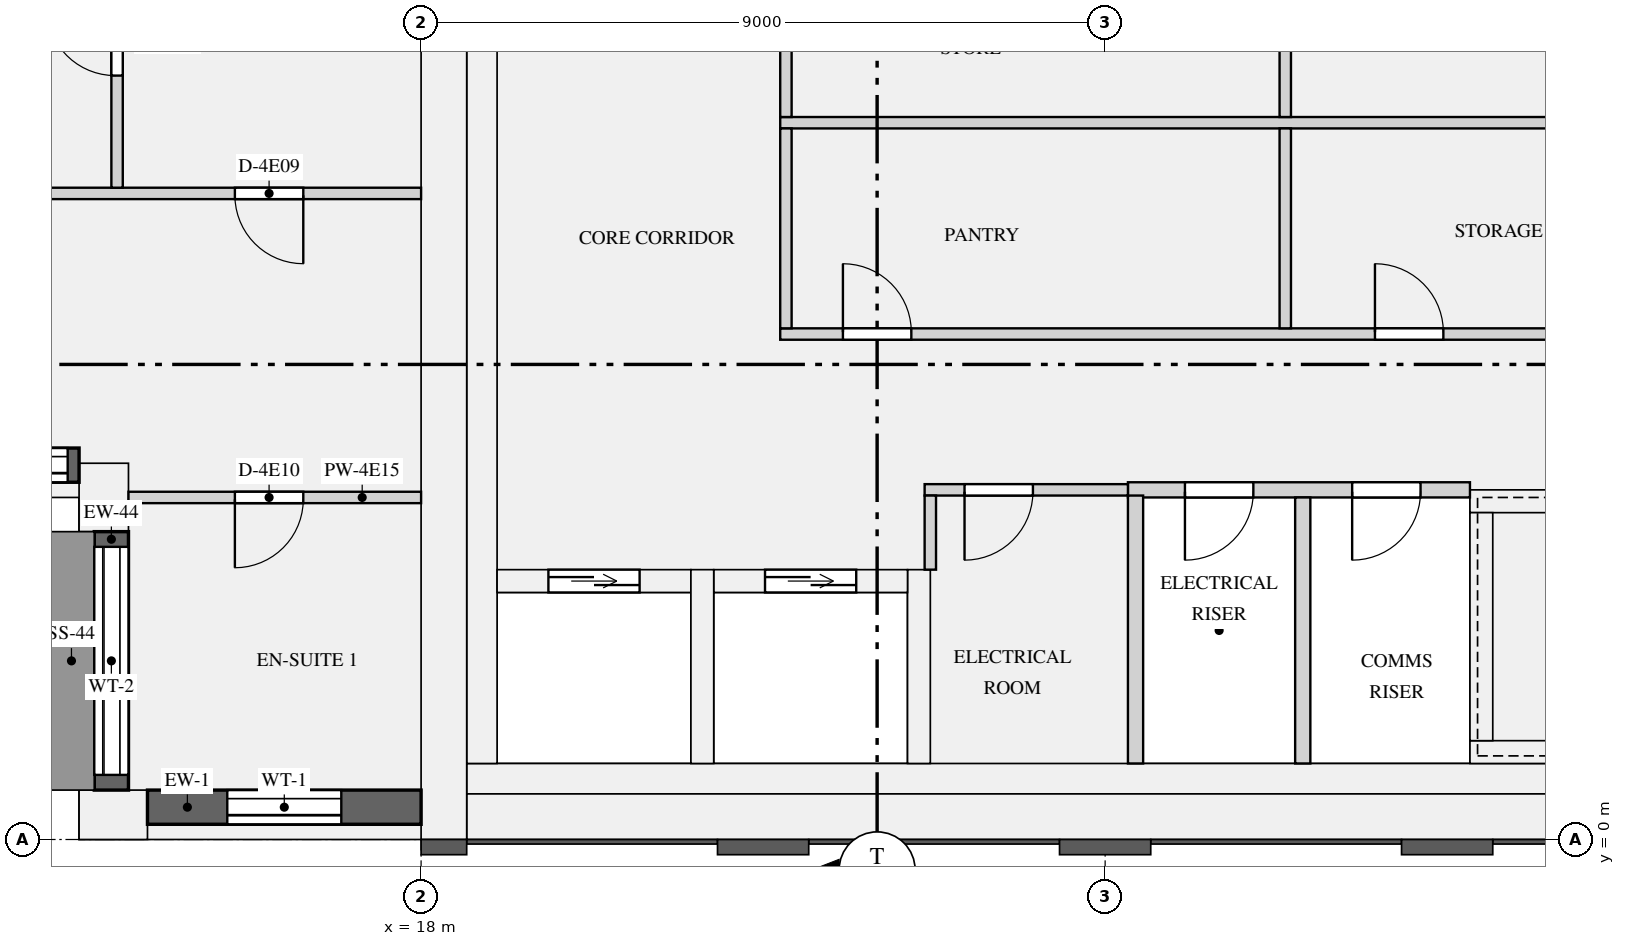
"""IFC4 building model, lengths in metres.
Left out: names, types, materials, properties, quantities, classifications, styles, units other than length and angle.
Written with IfcOpenShell. Run it as: python <this file> out.ifc"""

import sys

from ifc_helpers import new_model, si_unit, direction, frame, frame_2d, origin, origin_2d, place, context, subcontext, project, spatial, rectangle, extrude, element, fill, save


model = new_model("IFC4")
c1 = context("Model", 3, precision=1e-05, world=origin(), true_north=direction((0.0, 1.0)))
c2 = subcontext(c1, "Body", "Model", "MODEL_VIEW")
j1 = project(units=[si_unit("LENGTHUNIT", "METRE"), si_unit("PLANEANGLEUNIT", "RADIAN")], contexts=[c1])
p1 = place(None, origin())
s1 = spatial("IfcSite", under=j1, at=p1, CompositionType="ELEMENT")
p2 = place(p1, origin())
s2 = spatial("IfcBuilding", under=s1, at=p2, CompositionType="ELEMENT")
p3 = place(p2, frame((0.0, 0.0, 232.65)))
s3 = spatial("IfcBuildingStorey", under=s2, at=p3, CompositionType="ELEMENT", Elevation=232.65)
for number, where, z_axis, x_axis in (
    (1, (13.95, 0.325, 0.0), (0.0, 0.0, 1.0), (1.0, 0.0, 0.0)),
    (2, (13.825, 4.5, 0.0), (0.0, 0.0, 1.0), (0.0, -1.0, 0.0)),
):
    element("IfcColumn", number, at=place(p3, frame(where, z_axis=z_axis, x_axis=x_axis)), inside=s3, PredefinedType="USERDEFINED", context=c2, shape_type="SweptSolid", body=[
        extrude(rectangle(XDim=0.9, YDim=0.65, at=origin_2d()), origin(), (0.0, 0.0, 1.0), 3.15),
    ])
p4 = place(p3, frame((18.3, 0.0, 0.0), z_axis=(0.0, 0.0, 1.0), x_axis=(0.0, 1.0, 0.0)))
e3 = element("IfcWall", 3, at=p4, inside=s3, PredefinedType="SHEAR", context=c2, shape_type="SweptSolid", body=[
    extrude(rectangle(XDim=12.5, YDim=0.6, at=frame_2d((6.25, 0.0))), origin(), (0.0, 0.0, 1.0), 3.15),
])
p5 = place(p3, frame((18.6, 0.3, 0.0), z_axis=(0.0, 0.0, 1.0), x_axis=(1.0, 0.0, 0.0)))
e4 = element("IfcWall", 4, at=p5, inside=s3, PredefinedType="SHEAR", context=c2, shape_type="SweptSolid", body=[
    extrude(rectangle(XDim=34.8, YDim=0.6, at=frame_2d((17.4, 0.0))), origin(), (0.0, 0.0, 1.0), 3.15),
])
p6 = place(p3, frame((18.8, 1.0, 0.0), z_axis=(0.0, 0.0, 1.0), x_axis=(0.0, 1.0, 0.0)))
e5 = element("IfcWall", 5, at=p6, inside=s3, PredefinedType="SHEAR", context=c2, shape_type="SweptSolid", body=[
    extrude(rectangle(XDim=10.9, YDim=0.4, at=frame_2d((5.45, 0.0))), origin(), (0.0, 0.0, 1.0), 3.15),
])
p7 = place(p3, frame((18.6, 0.8, 0.0), z_axis=(0.0, 0.0, 1.0), x_axis=(1.0, 0.0, 0.0)))
e6 = element("IfcWall", 6, at=p7, inside=s3, PredefinedType="SHEAR", context=c2, shape_type="SweptSolid", body=[
    extrude(rectangle(XDim=34.8, YDim=0.4, at=frame_2d((17.4, 0.0))), origin(), (0.0, 0.0, 1.0), 3.15),
])
p8 = place(p3, frame((19.0, 3.4, 0.0), z_axis=(0.0, 0.0, 1.0), x_axis=(1.0, 0.0, 0.0)))
e7 = element("IfcWall", 7, at=p8, inside=s3, PredefinedType="SHEAR", context=c2, shape_type="SweptSolid", body=[
    extrude(rectangle(XDim=2.55, YDim=0.3, at=frame_2d((1.275, 0.0))), origin(), (0.0, 0.0, 1.0), 3.15),
])
p9 = place(p8, frame((0.675, 0.0, 0.0)))
e8 = element("IfcOpeningElement", 8, at=p9, cuts=e7, PredefinedType="OPENING", context=c2, shape_type="SweptSolid", body=[
    extrude(rectangle(XDim=1.2, YDim=2.1, at=frame_2d((0.6, 1.05))), frame((0.0, 0.16, 0.0), z_axis=(0.0, -1.0, 0.0), x_axis=(1.0, 0.0, 0.0)), (0.0, 0.0, 1.0), 0.32),
])
p10 = place(p3, frame((21.85, 3.4, 0.0), z_axis=(0.0, 0.0, 1.0), x_axis=(1.0, 0.0, 0.0)))
e9 = element("IfcWall", 9, at=p10, inside=s3, PredefinedType="SHEAR", context=c2, shape_type="SweptSolid", body=[
    extrude(rectangle(XDim=2.55, YDim=0.3, at=frame_2d((1.275, 0.0))), origin(), (0.0, 0.0, 1.0), 3.15),
])
p11 = place(p10, frame((0.675, 0.0, 0.0)))
e10 = element("IfcOpeningElement", 10, at=p11, cuts=e9, PredefinedType="OPENING", context=c2, shape_type="SweptSolid", body=[
    extrude(rectangle(XDim=1.2, YDim=2.1, at=frame_2d((0.6, 1.05))), frame((0.0, 0.16, 0.0), z_axis=(0.0, -1.0, 0.0), x_axis=(1.0, 0.0, 0.0)), (0.0, 0.0, 1.0), 0.32),
])
for number, where, z_axis, x_axis in (
    (11, (21.7, 1.0, 0.0), (0.0, 0.0, 1.0), (0.0, 1.0, 0.0)),
    (12, (24.55, 1.0, 0.0), (0.0, 0.0, 1.0), (0.0, 1.0, 0.0)),
):
    element("IfcWall", number, at=place(p3, frame(where, z_axis=z_axis, x_axis=x_axis)), inside=s3, PredefinedType="SHEAR", context=c2, shape_type="SweptSolid", body=[
        extrude(rectangle(XDim=2.55, YDim=0.3, at=frame_2d((1.275, 0.0))), origin(), (0.0, 0.0, 1.0), 3.15),
    ])
p12 = place(p3, frame((31.8, 1.15, 0.0), z_axis=(0.0, 0.0, 1.0), x_axis=(1.0, 0.0, 0.0)))
e13 = element("IfcWall", 13, at=p12, inside=s3, PredefinedType="SHEAR", context=c2, shape_type="SweptSolid", body=[
    extrude(rectangle(XDim=8.4, YDim=0.3, at=frame_2d((4.2, 0.0))), origin(), (0.0, 0.0, 1.0), 3.15),
])
p13 = place(p3, frame((31.8, 4.45, 0.0), z_axis=(0.0, 0.0, 1.0), x_axis=(1.0, 0.0, 0.0)))
e14 = element("IfcWall", 14, at=p13, inside=s3, PredefinedType="SHEAR", context=c2, shape_type="SweptSolid", body=[
    extrude(rectangle(XDim=8.4, YDim=0.3, at=frame_2d((4.2, 0.0))), origin(), (0.0, 0.0, 1.0), 3.15),
])
p14 = place(p13, frame((6.8, 0.0, 0.0)))
e15 = element("IfcOpeningElement", 15, at=p14, cuts=e14, PredefinedType="OPENING", context=c2, shape_type="SweptSolid", body=[
    extrude(rectangle(XDim=1.1, YDim=2.1, at=frame_2d((0.55, 1.05))), frame((0.0, 0.16, 0.0), z_axis=(0.0, -1.0, 0.0), x_axis=(1.0, 0.0, 0.0)), (0.0, 0.0, 1.0), 0.32),
])
p15 = place(p3, frame((31.95, 1.3, 0.0), z_axis=(0.0, 0.0, 1.0), x_axis=(0.0, 1.0, 0.0)))
e16 = element("IfcWall", 16, at=p15, inside=s3, PredefinedType="SHEAR", context=c2, shape_type="SweptSolid", body=[
    extrude(rectangle(XDim=3.0, YDim=0.3, at=frame_2d((1.5, 0.0))), origin(), (0.0, 0.0, 1.0), 3.15),
])
p16 = place(p3, frame((14.4, 0.425, 0.9), z_axis=(0.0, 0.0, 1.0), x_axis=(1.0, 0.0, 0.0)))
e17 = element("IfcWall", 17, at=p16, inside=s3, PredefinedType="SOLIDWALL", context=c2, shape_type="SweptSolid", body=[
    extrude(rectangle(XDim=3.6, YDim=0.45, at=frame_2d((1.8, 0.0))), origin(), (0.0, 0.0, 1.0), 1.9),
])
p17 = place(p16, frame((1.05, 0.0, 0.15)))
e18 = element("IfcOpeningElement", 18, at=p17, cuts=e17, PredefinedType="OPENING", context=c2, shape_type="SweptSolid", body=[
    extrude(rectangle(XDim=1.5, YDim=1.5, at=frame_2d((0.75, 0.75))), frame((0.0, 0.235, 0.0), z_axis=(0.0, -1.0, 0.0), x_axis=(1.0, 0.0, 0.0)), (0.0, 0.0, 1.0), 0.47),
])
p18 = place(p3, frame((9.9, 4.925, 0.9), z_axis=(0.0, 0.0, 1.0), x_axis=(1.0, 0.0, 0.0)))
e19 = element("IfcWall", 19, at=p18, inside=s3, PredefinedType="SOLIDWALL", context=c2, shape_type="SweptSolid", body=[
    extrude(rectangle(XDim=3.6, YDim=0.45, at=frame_2d((1.8, 0.0))), origin(), (0.0, 0.0, 1.0), 1.9),
])
p19 = place(p18, frame((0.15, 0.0, 0.15)))
e20 = element("IfcOpeningElement", 20, at=p19, cuts=e19, PredefinedType="OPENING", context=c2, shape_type="SweptSolid", body=[
    extrude(rectangle(XDim=3.3, YDim=1.5, at=frame_2d((1.65, 0.75))), frame((0.0, 0.235, 0.0), z_axis=(0.0, -1.0, 0.0), x_axis=(1.0, 0.0, 0.0)), (0.0, 0.0, 1.0), 0.47),
])
p20 = place(p3, frame((13.925, 4.05, 0.9), z_axis=(0.0, 0.0, 1.0), x_axis=(0.0, -1.0, 0.0)))
e21 = element("IfcWall", 21, at=p20, inside=s3, PredefinedType="SOLIDWALL", context=c2, shape_type="SweptSolid", body=[
    extrude(rectangle(XDim=3.4, YDim=0.45, at=frame_2d((1.7, 0.0))), origin(), (0.0, 0.0, 1.0), 1.9),
])
p21 = place(p20, frame((0.2, 0.0, 0.15)))
e22 = element("IfcOpeningElement", 22, at=p21, cuts=e21, PredefinedType="OPENING", context=c2, shape_type="SweptSolid", body=[
    extrude(rectangle(XDim=3.0, YDim=1.5, at=frame_2d((1.5, 0.75))), frame((0.0, 0.235, 0.0), z_axis=(0.0, -1.0, 0.0), x_axis=(1.0, 0.0, 0.0)), (0.0, 0.0, 1.0), 0.47),
])
p22 = place(p3, frame((27.3, 4.6, 0.0), z_axis=(0.0, 0.0, 1.0), x_axis=(1.0, 0.0, 0.0)))
e23 = element("IfcWall", 23, at=p22, inside=s3, PredefinedType="PARTITIONING", context=c2, shape_type="SweptSolid", body=[
    extrude(rectangle(XDim=4.5, YDim=0.2, at=frame_2d((2.25, 0.0))), origin(), (0.0, 0.0, 1.0), 2.8),
])
p23 = place(p22, frame((0.75, 0.0, 0.0)))
e24 = element("IfcOpeningElement", 24, at=p23, cuts=e23, PredefinedType="OPENING", context=c2, shape_type="SweptSolid", body=[
    extrude(rectangle(XDim=0.9, YDim=2.1, at=frame_2d((0.45, 1.05))), frame((0.0, 0.11, 0.0), z_axis=(0.0, -1.0, 0.0), x_axis=(1.0, 0.0, 0.0)), (0.0, 0.0, 1.0), 0.22),
])
p24 = place(p22, frame((2.95, 0.0, 0.0)))
e25 = element("IfcOpeningElement", 25, at=p24, cuts=e23, PredefinedType="OPENING", context=c2, shape_type="SweptSolid", body=[
    extrude(rectangle(XDim=0.9, YDim=2.1, at=frame_2d((0.45, 1.05))), frame((0.0, 0.11, 0.0), z_axis=(0.0, -1.0, 0.0), x_axis=(1.0, 0.0, 0.0)), (0.0, 0.0, 1.0), 0.22),
])
p25 = place(p3, frame((24.625, 4.6, 0.0), z_axis=(0.0, 0.0, 1.0), x_axis=(1.0, 0.0, 0.0)))
e26 = element("IfcWall", 26, at=p25, inside=s3, PredefinedType="PARTITIONING", context=c2, shape_type="SweptSolid", body=[
    extrude(rectangle(XDim=2.675, YDim=0.15, at=frame_2d((1.337, 0.0))), origin(), (0.0, 0.0, 1.0), 2.8),
])
p26 = place(p25, frame((0.525, 0.0, 0.0)))
e27 = element("IfcOpeningElement", 27, at=p26, cuts=e26, PredefinedType="OPENING", context=c2, shape_type="SweptSolid", body=[
    extrude(rectangle(XDim=0.9, YDim=2.1, at=frame_2d((0.45, 1.05))), frame((0.0, 0.085, 0.0), z_axis=(0.0, -1.0, 0.0), x_axis=(1.0, 0.0, 0.0)), (0.0, 0.0, 1.0), 0.17),
])
p27 = place(p3, frame((22.725, 6.65, 0.0), z_axis=(0.0, 0.0, 1.0), x_axis=(1.0, 0.0, 0.0)))
e28 = element("IfcWall", 28, at=p27, inside=s3, PredefinedType="PARTITIONING", context=c2, shape_type="SweptSolid", body=[
    extrude(rectangle(XDim=19.8, YDim=0.15, at=frame_2d((9.9, 0.0))), origin(), (0.0, 0.0, 1.0), 2.8),
])
p28 = place(p27, frame((0.825, 0.0, 0.0)))
e29 = element("IfcOpeningElement", 29, at=p28, cuts=e28, PredefinedType="OPENING", context=c2, shape_type="SweptSolid", body=[
    extrude(rectangle(XDim=0.9, YDim=2.1, at=frame_2d((0.45, 1.05))), frame((0.0, 0.085, 0.0), z_axis=(0.0, -1.0, 0.0), x_axis=(1.0, 0.0, 0.0)), (0.0, 0.0, 1.0), 0.17),
])
p29 = place(p27, frame((7.825, 0.0, 0.0)))
e30 = element("IfcOpeningElement", 30, at=p29, cuts=e28, PredefinedType="OPENING", context=c2, shape_type="SweptSolid", body=[
    extrude(rectangle(XDim=0.9, YDim=2.1, at=frame_2d((0.45, 1.05))), frame((0.0, 0.085, 0.0), z_axis=(0.0, -1.0, 0.0), x_axis=(1.0, 0.0, 0.0)), (0.0, 0.0, 1.0), 0.17),
])
p30 = place(p27, frame((14.475, 0.0, 0.0)))
e31 = element("IfcOpeningElement", 31, at=p30, cuts=e28, PredefinedType="OPENING", context=c2, shape_type="SweptSolid", body=[
    extrude(rectangle(XDim=0.9, YDim=2.1, at=frame_2d((0.45, 1.05))), frame((0.0, 0.085, 0.0), z_axis=(0.0, -1.0, 0.0), x_axis=(1.0, 0.0, 0.0)), (0.0, 0.0, 1.0), 0.17),
])
p31 = place(p3, frame((22.725, 9.43, 0.0), z_axis=(0.0, 0.0, 1.0), x_axis=(1.0, 0.0, 0.0)))
e32 = element("IfcWall", 32, at=p31, inside=s3, PredefinedType="PARTITIONING", context=c2, shape_type="SweptSolid", body=[
    extrude(rectangle(XDim=14.1, YDim=0.15, at=frame_2d((7.05, 0.0))), origin(), (0.0, 0.0, 1.0), 2.8),
])
p32 = place(p3, frame((27.4, 1.0, 0.0), z_axis=(0.0, 0.0, 1.0), x_axis=(0.0, 1.0, 0.0)))
e33 = element("IfcWall", 33, at=p32, inside=s3, PredefinedType="PARTITIONING", context=c2, shape_type="SweptSolid", body=[
    extrude(rectangle(XDim=3.525, YDim=0.2, at=frame_2d((1.762, 0.0))), origin(), (0.0, 0.0, 1.0), 2.8),
])
p33 = place(p3, frame((29.6, 1.0, 0.0), z_axis=(0.0, 0.0, 1.0), x_axis=(0.0, 1.0, 0.0)))
e34 = element("IfcWall", 34, at=p33, inside=s3, PredefinedType="PARTITIONING", context=c2, shape_type="SweptSolid", body=[
    extrude(rectangle(XDim=3.5, YDim=0.2, at=frame_2d((1.75, 0.0))), origin(), (0.0, 0.0, 1.0), 2.8),
])
p34 = place(p3, frame((24.7, 3.55, 0.0), z_axis=(0.0, 0.0, 1.0), x_axis=(0.0, 1.0, 0.0)))
e35 = element("IfcWall", 35, at=p34, inside=s3, PredefinedType="PARTITIONING", context=c2, shape_type="SweptSolid", body=[
    extrude(rectangle(XDim=0.975, YDim=0.15, at=frame_2d((0.487, 0.0))), origin(), (0.0, 0.0, 1.0), 2.8),
])
for number, where, z_axis, x_axis in (
    (36, (22.8, 6.725, 0.0), (0.0, 0.0, 1.0), (0.0, 1.0, 0.0)),
    (37, (29.37, 6.725, 0.0), (0.0, 0.0, 1.0), (0.0, 1.0, 0.0)),
):
    element("IfcWall", number, at=place(p3, frame(where, z_axis=z_axis, x_axis=x_axis)), inside=s3, PredefinedType="PARTITIONING", context=c2, shape_type="SweptSolid", body=[
        extrude(rectangle(XDim=2.63, YDim=0.15, at=frame_2d((1.315, 0.0))), origin(), (0.0, 0.0, 1.0), 2.8),
    ])
for number, where, z_axis, x_axis in (
    (38, (22.8, 9.505, 0.0), (0.0, 0.0, 1.0), (0.0, 1.0, 0.0)),
    (39, (29.37, 9.505, 0.0), (0.0, 0.0, 1.0), (0.0, 1.0, 0.0)),
):
    element("IfcWall", number, at=place(p3, frame(where, z_axis=z_axis, x_axis=x_axis)), inside=s3, PredefinedType="PARTITIONING", context=c2, shape_type="SweptSolid", body=[
        extrude(rectangle(XDim=2.395, YDim=0.15, at=frame_2d((1.198, 0.0))), origin(), (0.0, 0.0, 1.0), 2.8),
    ])
p35 = place(p3, frame((9.65, 8.5, 0.0), z_axis=(0.0, 0.0, 1.0), x_axis=(1.0, 0.0, 0.0)))
e40 = element("IfcWall", 40, at=p35, inside=s3, PredefinedType="PARTITIONING", context=c2, shape_type="SweptSolid", body=[
    extrude(rectangle(XDim=8.35, YDim=0.15, at=frame_2d((4.175, 0.0))), origin(), (0.0, 0.0, 1.0), 2.8),
])
p36 = place(p35, frame((5.9, 0.0, 0.0)))
e41 = element("IfcOpeningElement", 41, at=p36, cuts=e40, PredefinedType="OPENING", context=c2, shape_type="SweptSolid", body=[
    extrude(rectangle(XDim=0.9, YDim=2.1, at=frame_2d((0.45, 1.05))), frame((0.0, 0.085, 0.0), z_axis=(0.0, -1.0, 0.0), x_axis=(1.0, 0.0, 0.0)), (0.0, 0.0, 1.0), 0.17),
])
p37 = place(p3, frame((14.15, 4.5, 0.0), z_axis=(0.0, 0.0, 1.0), x_axis=(1.0, 0.0, 0.0)))
e42 = element("IfcWall", 42, at=p37, inside=s3, PredefinedType="PARTITIONING", context=c2, shape_type="SweptSolid", body=[
    extrude(rectangle(XDim=3.85, YDim=0.15, at=frame_2d((1.925, 0.0))), origin(), (0.0, 0.0, 1.0), 2.8),
])
p38 = place(p37, frame((1.4, 0.0, 0.0)))
e43 = element("IfcOpeningElement", 43, at=p38, cuts=e42, PredefinedType="OPENING", context=c2, shape_type="SweptSolid", body=[
    extrude(rectangle(XDim=0.9, YDim=2.1, at=frame_2d((0.45, 1.05))), frame((0.0, 0.085, 0.0), z_axis=(0.0, -1.0, 0.0), x_axis=(1.0, 0.0, 0.0)), (0.0, 0.0, 1.0), 0.17),
])
p39 = place(p3, frame((14.0, 8.575, 0.0), z_axis=(0.0, 0.0, 1.0), x_axis=(0.0, 1.0, 0.0)))
e44 = element("IfcWall", 44, at=p39, inside=s3, PredefinedType="PARTITIONING", context=c2, shape_type="SweptSolid", body=[
    extrude(rectangle(XDim=7.85, YDim=0.15, at=frame_2d((3.925, 0.0))), origin(), (0.0, 0.0, 1.0), 2.8),
])
p40 = place(p39, frame((1.475, 0.0, 0.0)))
e45 = element("IfcOpeningElement", 45, at=p40, cuts=e44, PredefinedType="OPENING", context=c2, shape_type="SweptSolid", body=[
    extrude(rectangle(XDim=0.9, YDim=2.1, at=frame_2d((0.45, 1.05))), frame((0.0, 0.085, 0.0), z_axis=(0.0, -1.0, 0.0), x_axis=(1.0, 0.0, 0.0)), (0.0, 0.0, 1.0), 0.17),
])
p41 = place(p17, origin())
e46 = element("IfcWindow", 46, at=p41, inside=s3, PartitioningType="SINGLE_PANEL", PredefinedType="WINDOW", context=c2, shape_type="SweptSolid", body=[
    extrude(rectangle(XDim=1.5, YDim=1.5, at=frame_2d((0.75, 0.75))), frame((0.0, -0.065, 0.0), z_axis=(0.0, -1.0, 0.0), x_axis=(1.0, 0.0, 0.0)), (0.0, 0.0, 1.0), 0.06),
])
fill(e18, e46)
p42 = place(p19, origin())
e47 = element("IfcWindow", 47, at=p42, inside=s3, PartitioningType="SINGLE_PANEL", PredefinedType="WINDOW", context=c2, shape_type="SweptSolid", body=[
    extrude(rectangle(XDim=3.3, YDim=1.5, at=frame_2d((1.65, 0.75))), frame((0.0, -0.065, 0.0), z_axis=(0.0, -1.0, 0.0), x_axis=(1.0, 0.0, 0.0)), (0.0, 0.0, 1.0), 0.06),
])
fill(e20, e47)
p43 = place(p21, origin())
e48 = element("IfcWindow", 48, at=p43, inside=s3, PartitioningType="SINGLE_PANEL", PredefinedType="WINDOW", context=c2, shape_type="SweptSolid", body=[
    extrude(rectangle(XDim=3.0, YDim=1.5, at=frame_2d((1.5, 0.75))), frame((0.0, -0.065, 0.0), z_axis=(0.0, -1.0, 0.0), x_axis=(1.0, 0.0, 0.0)), (0.0, 0.0, 1.0), 0.06),
])
fill(e22, e48)
p44 = place(p9, origin())
e49 = element("IfcDoor", 49, at=p44, inside=s3, OperationType="DOUBLE_DOOR_SLIDING", PredefinedType="DOOR", context=c2, shape_type="SweptSolid", body=[
    extrude(rectangle(XDim=1.2, YDim=2.1, at=frame_2d((0.6, 1.05))), frame((0.0, 0.025, 0.0), z_axis=(0.0, -1.0, 0.0), x_axis=(1.0, 0.0, 0.0)), (0.0, 0.0, 1.0), 0.05),
])
fill(e8, e49)
p45 = place(p11, origin())
e50 = element("IfcDoor", 50, at=p45, inside=s3, OperationType="DOUBLE_DOOR_SLIDING", PredefinedType="DOOR", context=c2, shape_type="SweptSolid", body=[
    extrude(rectangle(XDim=1.2, YDim=2.1, at=frame_2d((0.6, 1.05))), frame((0.0, 0.025, 0.0), z_axis=(0.0, -1.0, 0.0), x_axis=(1.0, 0.0, 0.0)), (0.0, 0.0, 1.0), 0.05),
])
fill(e10, e50)
p46 = place(p26, frame((0.9, 0.0, 0.0), z_axis=(0.0, 0.0, 1.0), x_axis=(-1.0, 0.0, 0.0)))
e51 = element("IfcDoor", 51, at=p46, inside=s3, OperationType="SINGLE_SWING_RIGHT", PredefinedType="DOOR", context=c2, shape_type="SweptSolid", body=[
    extrude(rectangle(XDim=0.9, YDim=2.1, at=frame_2d((0.45, 1.05))), frame((0.0, 0.025, 0.0), z_axis=(0.0, -1.0, 0.0), x_axis=(1.0, 0.0, 0.0)), (0.0, 0.0, 1.0), 0.05),
])
fill(e27, e51)
p47 = place(p28, origin())
e52 = element("IfcDoor", 52, at=p47, inside=s3, OperationType="SINGLE_SWING_LEFT", PredefinedType="DOOR", context=c2, shape_type="SweptSolid", body=[
    extrude(rectangle(XDim=0.9, YDim=2.1, at=frame_2d((0.45, 1.05))), frame((0.0, 0.025, 0.0), z_axis=(0.0, -1.0, 0.0), x_axis=(1.0, 0.0, 0.0)), (0.0, 0.0, 1.0), 0.05),
])
fill(e29, e52)
p48 = place(p29, origin())
e53 = element("IfcDoor", 53, at=p48, inside=s3, OperationType="SINGLE_SWING_LEFT", PredefinedType="DOOR", context=c2, shape_type="SweptSolid", body=[
    extrude(rectangle(XDim=0.9, YDim=2.1, at=frame_2d((0.45, 1.05))), frame((0.0, 0.025, 0.0), z_axis=(0.0, -1.0, 0.0), x_axis=(1.0, 0.0, 0.0)), (0.0, 0.0, 1.0), 0.05),
])
fill(e30, e53)
p49 = place(p23, frame((0.9, 0.0, 0.0), z_axis=(0.0, 0.0, 1.0), x_axis=(-1.0, 0.0, 0.0)))
e54 = element("IfcDoor", 54, at=p49, inside=s3, OperationType="SINGLE_SWING_RIGHT", PredefinedType="DOOR", context=c2, shape_type="SweptSolid", body=[
    extrude(rectangle(XDim=0.9, YDim=2.1, at=frame_2d((0.45, 1.05))), frame((0.0, 0.025, 0.0), z_axis=(0.0, -1.0, 0.0), x_axis=(1.0, 0.0, 0.0)), (0.0, 0.0, 1.0), 0.05),
])
fill(e24, e54)
p50 = place(p24, frame((0.9, 0.0, 0.0), z_axis=(0.0, 0.0, 1.0), x_axis=(-1.0, 0.0, 0.0)))
e55 = element("IfcDoor", 55, at=p50, inside=s3, OperationType="SINGLE_SWING_RIGHT", PredefinedType="DOOR", context=c2, shape_type="SweptSolid", body=[
    extrude(rectangle(XDim=0.9, YDim=2.1, at=frame_2d((0.45, 1.05))), frame((0.0, 0.025, 0.0), z_axis=(0.0, -1.0, 0.0), x_axis=(1.0, 0.0, 0.0)), (0.0, 0.0, 1.0), 0.05),
])
fill(e25, e55)
p51 = place(p40, origin())
e56 = element("IfcDoor", 56, at=p51, inside=s3, OperationType="SINGLE_SWING_RIGHT", PredefinedType="DOOR", context=c2, shape_type="SweptSolid", body=[
    extrude(rectangle(XDim=0.9, YDim=2.1, at=frame_2d((0.45, 1.05))), frame((0.0, 0.025, 0.0), z_axis=(0.0, -1.0, 0.0), x_axis=(1.0, 0.0, 0.0)), (0.0, 0.0, 1.0), 0.05),
])
fill(e45, e56)
p52 = place(p36, frame((0.9, 0.0, 0.0), z_axis=(0.0, 0.0, 1.0), x_axis=(-1.0, 0.0, 0.0)))
e57 = element("IfcDoor", 57, at=p52, inside=s3, OperationType="SINGLE_SWING_LEFT", PredefinedType="DOOR", context=c2, shape_type="SweptSolid", body=[
    extrude(rectangle(XDim=0.9, YDim=2.1, at=frame_2d((0.45, 1.05))), frame((0.0, 0.025, 0.0), z_axis=(0.0, -1.0, 0.0), x_axis=(1.0, 0.0, 0.0)), (0.0, 0.0, 1.0), 0.05),
])
fill(e41, e57)
p53 = place(p38, frame((0.9, 0.0, 0.0), z_axis=(0.0, 0.0, 1.0), x_axis=(-1.0, 0.0, 0.0)))
e58 = element("IfcDoor", 58, at=p53, inside=s3, OperationType="SINGLE_SWING_RIGHT", PredefinedType="DOOR", context=c2, shape_type="SweptSolid", body=[
    extrude(rectangle(XDim=0.9, YDim=2.1, at=frame_2d((0.45, 1.05))), frame((0.0, 0.025, 0.0), z_axis=(0.0, -1.0, 0.0), x_axis=(1.0, 0.0, 0.0)), (0.0, 0.0, 1.0), 0.05),
])
fill(e43, e58)
save(model, sys.argv[1])
